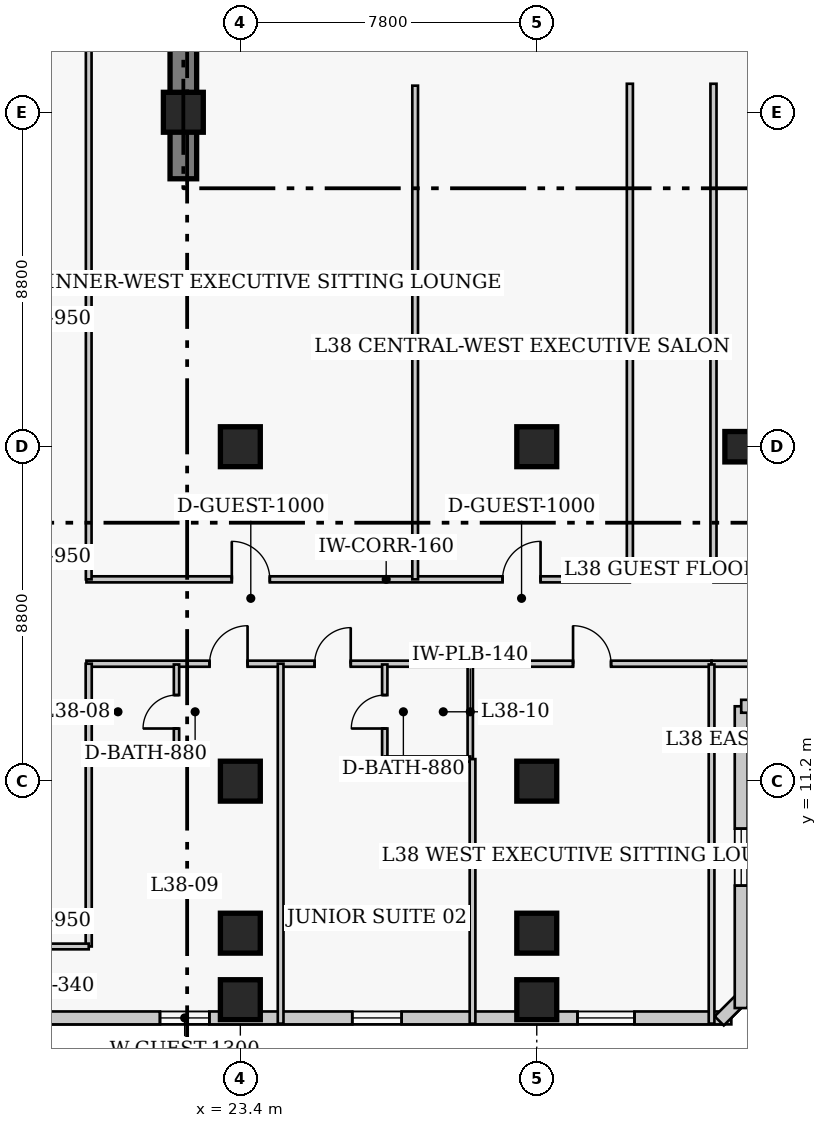
"""IFC4 building model, lengths in metres.
Left out: names, types, materials, properties, quantities, classifications, styles, units other than length and angle.
Written with IfcOpenShell. Run it as: python <this file> out.ifc"""

import sys

from ifc_helpers import new_model, si_unit, direction, frame, frame_2d, origin, origin_2d, place, context, subcontext, project, spatial, rectangle, extrude, element, fill, save


model = new_model("IFC4")
c1 = context("Model", 3, precision=1e-05, world=origin(), true_north=direction((0.0, 1.0)))
c2 = subcontext(c1, "Body", "Model", "MODEL_VIEW")
j1 = project(units=[si_unit("LENGTHUNIT", "METRE"), si_unit("PLANEANGLEUNIT", "RADIAN")], contexts=[c1])
p1 = place(None, origin())
s1 = spatial("IfcSite", under=j1, at=p1, CompositionType="ELEMENT")
p2 = place(p1, origin())
s2 = spatial("IfcBuilding", under=s1, at=p2, CompositionType="ELEMENT")
p3 = place(p2, frame((0.0, 0.0, 153.6)))
s3 = spatial("IfcBuildingStorey", under=s2, at=p3, CompositionType="ELEMENT", Elevation=153.6)
p4 = place(p3, frame((21.9, 27.05, 0.0), z_axis=(0.0, 0.0, 1.0), x_axis=(0.0, 1.0, 0.0)))
e1 = element("IfcWall", 1, at=p4, inside=s3, PredefinedType="SHEAR", context=c2, shape_type="SweptSolid", body=[
    extrude(rectangle(XDim=13.62, YDim=0.7, at=frame_2d((6.81, 0.0))), origin(), (0.0, 0.0, 1.0), 3.8),
])
for number, where, z_axis, x_axis in (
    (2, (23.4, 11.2, 0.0), (0.0, 0.0, 1.0), (1.0, 0.0, 0.0)),
    (3, (23.4, 20.0, 0.0), (0.0, 0.0, 1.0), (1.0, 0.0, 0.0)),
    (4, (31.2, 11.2, 0.0), (0.0, 0.0, 1.0), (1.0, 0.0, 0.0)),
    (5, (31.2, 20.0, 0.0), (0.0, 0.0, 1.0), (1.0, 0.0, 0.0)),
):
    element("IfcColumn", number, at=place(p3, frame(where, z_axis=z_axis, x_axis=x_axis)), inside=s3, PredefinedType="COLUMN", context=c2, shape_type="SweptSolid", body=[
        extrude(rectangle(XDim=1.05, YDim=1.05, at=origin_2d()), origin(), (0.0, 0.0, 1.0), 3.8),
    ])
p5 = place(p3, frame((36.75, 20.0, 0.0), z_axis=(0.0, 0.0, 1.0), x_axis=(1.0, 0.0, 0.0)))
e6 = element("IfcColumn", 6, at=p5, inside=s3, PredefinedType="COLUMN", context=c2, shape_type="SweptSolid", body=[
    extrude(rectangle(XDim=1.2, YDim=0.8, at=origin_2d()), origin(), (0.0, 0.0, 1.0), 3.8),
])
for number, where, z_axis, x_axis in (
    (7, (21.9, 28.8, 0.0), (0.0, 0.0, 1.0), (1.0, 0.0, 0.0)),
    (8, (23.4, 7.2, 0.0), (0.0, 0.0, 1.0), (1.0, 0.0, 0.0)),
    (9, (31.2, 7.2, 0.0), (0.0, 0.0, 1.0), (1.0, 0.0, 0.0)),
    (10, (23.4, 5.45, 0.0), (0.0, 0.0, 1.0), (1.0, 0.0, 0.0)),
    (11, (31.2, 5.45, 0.0), (0.0, 0.0, 1.0), (1.0, 0.0, 0.0)),
):
    element("IfcColumn", number, at=place(p3, frame(where, z_axis=z_axis, x_axis=x_axis)), inside=s3, PredefinedType="COLUMN", context=c2, shape_type="SweptSolid", body=[
        extrude(rectangle(XDim=1.05, YDim=1.05, at=origin_2d()), origin(), (0.0, 0.0, 1.0), 3.8),
    ])
p6 = place(p3, frame((9.63, 4.97, 0.0), z_axis=(0.0, 0.0, 1.0), x_axis=(1.0, 0.0, 0.0)))
e12 = element("IfcWall", 12, at=p6, inside=s3, PredefinedType="SOLIDWALL", context=c2, shape_type="SweptSolid", body=[
    extrude(rectangle(XDim=26.69, YDim=0.34, at=frame_2d((13.345, 0.0))), origin(), (0.0, 0.0, 1.0), 3.55),
])
p7 = place(p6, frame((3.048, 0.0, 0.85)))
e13 = element("IfcOpeningElement", 13, at=p7, cuts=e12, PredefinedType="OPENING", context=c2, shape_type="SweptSolid", body=[
    extrude(rectangle(XDim=1.5, YDim=1.75, at=frame_2d((0.75, 0.875))), frame((0.0, 0.18, 0.0), z_axis=(0.0, -1.0, 0.0), x_axis=(1.0, 0.0, 0.0)), (0.0, 0.0, 1.0), 0.36),
])
p8 = place(p6, frame((22.642, 0.0, 0.85)))
e14 = element("IfcOpeningElement", 14, at=p8, cuts=e12, PredefinedType="OPENING", context=c2, shape_type="SweptSolid", body=[
    extrude(rectangle(XDim=1.5, YDim=1.75, at=frame_2d((0.75, 0.875))), frame((0.0, 0.18, 0.0), z_axis=(0.0, -1.0, 0.0), x_axis=(1.0, 0.0, 0.0)), (0.0, 0.0, 1.0), 0.36),
])
p9 = place(p6, frame((11.655, 0.0, 0.85)))
e15 = element("IfcOpeningElement", 15, at=p9, cuts=e12, PredefinedType="OPENING", context=c2, shape_type="SweptSolid", body=[
    extrude(rectangle(XDim=1.3, YDim=1.7, at=frame_2d((0.65, 0.85))), frame((0.0, 0.18, 0.0), z_axis=(0.0, -1.0, 0.0), x_axis=(1.0, 0.0, 0.0)), (0.0, 0.0, 1.0), 0.36),
])
p10 = place(p6, frame((16.715, 0.0, 0.85)))
e16 = element("IfcOpeningElement", 16, at=p10, cuts=e12, PredefinedType="OPENING", context=c2, shape_type="SweptSolid", body=[
    extrude(rectangle(XDim=1.3, YDim=1.7, at=frame_2d((0.65, 0.85))), frame((0.0, 0.18, 0.0), z_axis=(0.0, -1.0, 0.0), x_axis=(1.0, 0.0, 0.0)), (0.0, 0.0, 1.0), 0.36),
])
p11 = place(p3, frame((36.001, 4.892, 0.0), z_axis=(0.0, 0.0, 1.0), x_axis=(0.707106781187, 0.707106781187, 0.0)))
e17 = element("IfcWall", 17, at=p11, inside=s3, PredefinedType="SOLIDWALL", context=c2, shape_type="SweptSolid", body=[
    extrude(rectangle(XDim=0.929, YDim=0.34, at=frame_2d((0.464, 0.0))), origin(), (0.0, 0.0, 1.0), 3.55),
])
p12 = place(p3, frame((36.58, 5.23, 0.0), z_axis=(0.0, 0.0, 1.0), x_axis=(0.0, 1.0, 0.0)))
e18 = element("IfcWall", 18, at=p12, inside=s3, PredefinedType="SOLIDWALL", context=c2, shape_type="SweptSolid", body=[
    extrude(rectangle(XDim=7.94, YDim=0.34, at=frame_2d((3.97, 0.0))), origin(), (0.0, 0.0, 1.0), 3.55),
])
p13 = place(p12, frame((3.22, 0.0, 0.85)))
e19 = element("IfcOpeningElement", 19, at=p13, cuts=e18, PredefinedType="OPENING", context=c2, shape_type="SweptSolid", body=[
    extrude(rectangle(XDim=1.5, YDim=1.75, at=frame_2d((0.75, 0.875))), frame((0.0, 0.18, 0.0), z_axis=(0.0, -1.0, 0.0), x_axis=(1.0, 0.0, 0.0)), (0.0, 0.0, 1.0), 0.36),
])
p14 = place(p3, frame((36.58, 13.17, 0.0), z_axis=(0.0, 0.0, 1.0), x_axis=(1.0, 0.0, 0.0)))
e20 = element("IfcWall", 20, at=p14, inside=s3, PredefinedType="SOLIDWALL", context=c2, shape_type="SweptSolid", body=[
    extrude(rectangle(XDim=4.84, YDim=0.34, at=frame_2d((2.42, 0.0))), origin(), (0.0, 0.0, 1.0), 3.55),
])
p15 = place(p14, frame((1.67, 0.0, 0.85)))
e21 = element("IfcOpeningElement", 21, at=p15, cuts=e20, PredefinedType="OPENING", context=c2, shape_type="SweptSolid", body=[
    extrude(rectangle(XDim=1.5, YDim=1.75, at=frame_2d((0.75, 0.875))), frame((0.0, 0.18, 0.0), z_axis=(0.0, -1.0, 0.0), x_axis=(1.0, 0.0, 0.0)), (0.0, 0.0, 1.0), 0.36),
])
p16 = place(p3, frame((19.35, 16.51, 0.0), z_axis=(0.0, 0.0, 1.0), x_axis=(1.0, 0.0, 0.0)))
e22 = element("IfcWall", 22, at=p16, inside=s3, PredefinedType="PARTITIONING", context=c2, shape_type="SweptSolid", body=[
    extrude(rectangle(XDim=14.3, YDim=0.16, at=frame_2d((7.15, 0.0))), origin(), (0.0, 0.0, 1.0), 3.55),
])
p17 = place(p16, frame((3.825, 0.0, 0.0)))
e23 = element("IfcOpeningElement", 23, at=p17, cuts=e22, PredefinedType="OPENING", context=c2, shape_type="SweptSolid", body=[
    extrude(rectangle(XDim=1.0, YDim=2.15, at=frame_2d((0.5, 1.075))), frame((0.0, 0.09, 0.0), z_axis=(0.0, -1.0, 0.0), x_axis=(1.0, 0.0, 0.0)), (0.0, 0.0, 1.0), 0.18),
])
p18 = place(p16, frame((10.95, 0.0, 0.0)))
e24 = element("IfcOpeningElement", 24, at=p18, cuts=e22, PredefinedType="OPENING", context=c2, shape_type="SweptSolid", body=[
    extrude(rectangle(XDim=1.0, YDim=2.15, at=frame_2d((0.5, 1.075))), frame((0.0, 0.09, 0.0), z_axis=(0.0, -1.0, 0.0), x_axis=(1.0, 0.0, 0.0)), (0.0, 0.0, 1.0), 0.18),
])
p19 = place(p3, frame((35.85, 16.51, 0.0), z_axis=(0.0, 0.0, 1.0), x_axis=(1.0, 0.0, 0.0)))
e25 = element("IfcWall", 25, at=p19, inside=s3, PredefinedType="PARTITIONING", context=c2, shape_type="SweptSolid", body=[
    extrude(rectangle(XDim=22.6, YDim=0.16, at=frame_2d((11.3, 0.0))), origin(), (0.0, 0.0, 1.0), 3.55),
])
p20 = place(p19, frame((10.35, 0.0, 0.0)))
e26 = element("IfcOpeningElement", 26, at=p20, cuts=e25, PredefinedType="OPENING", context=c2, shape_type="SweptSolid", body=[
    extrude(rectangle(XDim=1.0, YDim=2.15, at=frame_2d((0.5, 1.075))), frame((0.0, 0.09, 0.0), z_axis=(0.0, -1.0, 0.0), x_axis=(1.0, 0.0, 0.0)), (0.0, 0.0, 1.0), 0.18),
])
p21 = place(p19, frame((18.65, 0.0, 0.0)))
e27 = element("IfcOpeningElement", 27, at=p21, cuts=e25, PredefinedType="OPENING", context=c2, shape_type="SweptSolid", body=[
    extrude(rectangle(XDim=1.0, YDim=2.15, at=frame_2d((0.5, 1.075))), frame((0.0, 0.09, 0.0), z_axis=(0.0, -1.0, 0.0), x_axis=(1.0, 0.0, 0.0)), (0.0, 0.0, 1.0), 0.18),
])
for number, where, z_axis, x_axis in (
    (28, (33.65, 16.51, 0.0), (0.0, 0.0, 1.0), (0.0, 1.0, 0.0)),
    (29, (35.85, 16.51, 0.0), (0.0, 0.0, 1.0), (0.0, 1.0, 0.0)),
):
    element("IfcWall", number, at=place(p3, frame(where, z_axis=z_axis, x_axis=x_axis)), inside=s3, PredefinedType="PARTITIONING", context=c2, shape_type="SweptSolid", body=[
        extrude(rectangle(XDim=13.04, YDim=0.16, at=frame_2d((6.52, 0.0))), origin(), (0.0, 0.0, 1.0), 3.55),
    ])
p22 = place(p3, frame((19.35, 14.29, 0.0), z_axis=(0.0, 0.0, 1.0), x_axis=(1.0, 0.0, 0.0)))
e30 = element("IfcWall", 30, at=p22, inside=s3, PredefinedType="PARTITIONING", context=c2, shape_type="SweptSolid", body=[
    extrude(rectangle(XDim=16.45, YDim=0.16, at=frame_2d((8.225, 0.0))), origin(), (0.0, 0.0, 1.0), 3.55),
])
p23 = place(p22, frame((3.24, 0.0, 0.0)))
e31 = element("IfcOpeningElement", 31, at=p23, cuts=e30, PredefinedType="OPENING", context=c2, shape_type="SweptSolid", body=[
    extrude(rectangle(XDim=1.0, YDim=2.15, at=frame_2d((0.5, 1.075))), frame((0.0, 0.09, 0.0), z_axis=(0.0, -1.0, 0.0), x_axis=(1.0, 0.0, 0.0)), (0.0, 0.0, 1.0), 0.18),
])
p24 = place(p22, frame((6.005, 0.0, 0.0)))
e32 = element("IfcOpeningElement", 32, at=p24, cuts=e30, PredefinedType="OPENING", context=c2, shape_type="SweptSolid", body=[
    extrude(rectangle(XDim=0.95, YDim=2.1, at=frame_2d((0.475, 1.05))), frame((0.0, 0.09, 0.0), z_axis=(0.0, -1.0, 0.0), x_axis=(1.0, 0.0, 0.0)), (0.0, 0.0, 1.0), 0.18),
])
p25 = place(p22, frame((12.805, 0.0, 0.0)))
e33 = element("IfcOpeningElement", 33, at=p25, cuts=e30, PredefinedType="OPENING", context=c2, shape_type="SweptSolid", body=[
    extrude(rectangle(XDim=1.0, YDim=2.15, at=frame_2d((0.5, 1.075))), frame((0.0, 0.09, 0.0), z_axis=(0.0, -1.0, 0.0), x_axis=(1.0, 0.0, 0.0)), (0.0, 0.0, 1.0), 0.18),
])
p26 = place(p3, frame((35.8, 14.29, 0.0), z_axis=(0.0, 0.0, 1.0), x_axis=(1.0, 0.0, 0.0)))
e34 = element("IfcWall", 34, at=p26, inside=s3, PredefinedType="PARTITIONING", context=c2, shape_type="SweptSolid", body=[
    extrude(rectangle(XDim=22.65, YDim=0.16, at=frame_2d((11.325, 0.0))), origin(), (0.0, 0.0, 1.0), 3.55),
])
p27 = place(p26, frame((4.873, 0.0, 0.0)))
e35 = element("IfcOpeningElement", 35, at=p27, cuts=e34, PredefinedType="OPENING", context=c2, shape_type="SweptSolid", body=[
    extrude(rectangle(XDim=1.0, YDim=2.15, at=frame_2d((0.5, 1.075))), frame((0.0, 0.09, 0.0), z_axis=(0.0, -1.0, 0.0), x_axis=(1.0, 0.0, 0.0)), (0.0, 0.0, 1.0), 0.18),
])
p28 = place(p3, frame((19.41, 6.85, 0.0), z_axis=(0.0, 0.0, 1.0), x_axis=(0.0, 1.0, 0.0)))
e36 = element("IfcWall", 36, at=p28, inside=s3, PredefinedType="PARTITIONING", context=c2, shape_type="SweptSolid", body=[
    extrude(rectangle(XDim=7.44, YDim=0.16, at=frame_2d((3.72, 0.0))), origin(), (0.0, 0.0, 1.0), 3.093),
])
p29 = place(p3, frame((17.19, 6.85, 0.0), z_axis=(0.0, 0.0, 1.0), x_axis=(1.0, 0.0, 0.0)))
e37 = element("IfcWall", 37, at=p29, inside=s3, PredefinedType="PARTITIONING", context=c2, shape_type="SweptSolid", body=[
    extrude(rectangle(XDim=2.22, YDim=0.15, at=frame_2d((1.11, 0.0))), origin(), (0.0, 0.0, 1.0), 3.55),
])
p30 = place(p3, frame((19.41, 16.51, 0.0), z_axis=(0.0, 0.0, 1.0), x_axis=(0.0, 1.0, 0.0)))
e38 = element("IfcWall", 38, at=p30, inside=s3, PredefinedType="PARTITIONING", context=c2, shape_type="SweptSolid", body=[
    extrude(rectangle(XDim=16.29, YDim=0.15, at=frame_2d((8.145, 0.0))), origin(), (0.0, 0.0, 1.0), 3.093),
])
p31 = place(p3, frame((28.0, 16.51, 0.0), z_axis=(0.0, 0.0, 1.0), x_axis=(0.0, 1.0, 0.0)))
e39 = element("IfcWall", 39, at=p31, inside=s3, PredefinedType="PARTITIONING", context=c2, shape_type="SweptSolid", body=[
    extrude(rectangle(XDim=12.99, YDim=0.15, at=frame_2d((6.495, 0.0))), origin(), (0.0, 0.0, 1.0), 3.55),
])
p32 = place(p3, frame((21.72, 11.78, 0.0), z_axis=(0.0, 0.0, 1.0), x_axis=(0.0, 1.0, 0.0)))
e40 = element("IfcWall", 40, at=p32, inside=s3, PredefinedType="PLUMBINGWALL", context=c2, shape_type="SweptSolid", body=[
    extrude(rectangle(XDim=2.49, YDim=0.14, at=frame_2d((1.245, 0.0))), origin(), (0.0, 0.0, 1.0), 3.55),
])
p33 = place(p32, frame((0.805, 0.0, 0.0)))
e41 = element("IfcOpeningElement", 41, at=p33, cuts=e40, PredefinedType="OPENING", context=c2, shape_type="SweptSolid", body=[
    extrude(rectangle(XDim=0.88, YDim=2.05, at=frame_2d((0.44, 1.025))), frame((0.0, 0.08, 0.0), z_axis=(0.0, -1.0, 0.0), x_axis=(1.0, 0.0, 0.0)), (0.0, 0.0, 1.0), 0.16),
])
p34 = place(p3, frame((19.47, 11.78, 0.0), z_axis=(0.0, 0.0, 1.0), x_axis=(1.0, 0.0, 0.0)))
e42 = element("IfcWall", 42, at=p34, inside=s3, PredefinedType="PLUMBINGWALL", context=c2, shape_type="SweptSolid", body=[
    extrude(rectangle(XDim=2.25, YDim=0.14, at=frame_2d((1.125, 0.0))), origin(), (0.0, 0.0, 1.0), 3.55),
])
p35 = place(p3, frame((24.46, 4.82, 0.0), z_axis=(0.0, 0.0, 1.0), x_axis=(0.0, 1.0, 0.0)))
e43 = element("IfcWall", 43, at=p35, inside=s3, PredefinedType="PARTITIONING", context=c2, shape_type="SweptSolid", body=[
    extrude(rectangle(XDim=9.47, YDim=0.15, at=frame_2d((4.735, 0.0))), origin(), (0.0, 0.0, 1.0), 3.55),
])
p36 = place(p3, frame((27.2, 11.78, 0.0), z_axis=(0.0, 0.0, 1.0), x_axis=(0.0, 1.0, 0.0)))
e44 = element("IfcWall", 44, at=p36, inside=s3, PredefinedType="PLUMBINGWALL", context=c2, shape_type="SweptSolid", body=[
    extrude(rectangle(XDim=2.49, YDim=0.14, at=frame_2d((1.245, 0.0))), origin(), (0.0, 0.0, 1.0), 3.093),
])
p37 = place(p36, frame((0.805, 0.0, 0.0)))
e45 = element("IfcOpeningElement", 45, at=p37, cuts=e44, PredefinedType="OPENING", context=c2, shape_type="SweptSolid", body=[
    extrude(rectangle(XDim=0.88, YDim=2.05, at=frame_2d((0.44, 1.025))), frame((0.0, 0.08, 0.0), z_axis=(0.0, -1.0, 0.0), x_axis=(1.0, 0.0, 0.0)), (0.0, 0.0, 1.0), 0.16),
])
p38 = place(p3, frame((29.45, 11.78, 0.0), z_axis=(0.0, 0.0, 1.0), x_axis=(0.0, 1.0, 0.0)))
e46 = element("IfcWall", 46, at=p38, inside=s3, PredefinedType="PLUMBINGWALL", context=c2, shape_type="SweptSolid", body=[
    extrude(rectangle(XDim=2.49, YDim=0.14, at=frame_2d((1.245, 0.0))), origin(), (0.0, 0.0, 1.0), 3.55),
])
p39 = place(p3, frame((27.2, 11.78, 0.0), z_axis=(0.0, 0.0, 1.0), x_axis=(1.0, 0.0, 0.0)))
e47 = element("IfcWall", 47, at=p39, inside=s3, PredefinedType="PLUMBINGWALL", context=c2, shape_type="SweptSolid", body=[
    extrude(rectangle(XDim=2.25, YDim=0.14, at=frame_2d((1.125, 0.0))), origin(), (0.0, 0.0, 1.0), 3.55),
])
p40 = place(p3, frame((29.51, 4.82, 0.0), z_axis=(0.0, 0.0, 1.0), x_axis=(0.0, 1.0, 0.0)))
e48 = element("IfcWall", 48, at=p40, inside=s3, PredefinedType="PARTITIONING", context=c2, shape_type="SweptSolid", body=[
    extrude(rectangle(XDim=6.96, YDim=0.15, at=frame_2d((3.48, 0.0))), origin(), (0.0, 0.0, 1.0), 3.55),
])
p41 = place(p3, frame((35.8, 4.82, 0.0), z_axis=(0.0, 0.0, 1.0), x_axis=(0.0, 1.0, 0.0)))
e49 = element("IfcWall", 49, at=p41, inside=s3, PredefinedType="PARTITIONING", context=c2, shape_type="SweptSolid", body=[
    extrude(rectangle(XDim=9.45, YDim=0.15, at=frame_2d((4.725, 0.0))), origin(), (0.0, 0.0, 1.0), 3.55),
])
p42 = place(p8, origin())
e50 = element("IfcWindow", 50, at=p42, inside=s3, PartitioningType="SINGLE_PANEL", PredefinedType="WINDOW", context=c2, shape_type="SweptSolid", body=[
    extrude(rectangle(XDim=1.5, YDim=1.75, at=frame_2d((0.75, 0.875))), frame((0.0, 0.03, 0.0), z_axis=(0.0, -1.0, 0.0), x_axis=(1.0, 0.0, 0.0)), (0.0, 0.0, 1.0), 0.06),
])
fill(e14, e50)
p43 = place(p13, origin())
e51 = element("IfcWindow", 51, at=p43, inside=s3, PartitioningType="SINGLE_PANEL", PredefinedType="WINDOW", context=c2, shape_type="SweptSolid", body=[
    extrude(rectangle(XDim=1.5, YDim=1.75, at=frame_2d((0.75, 0.875))), frame((0.0, 0.03, 0.0), z_axis=(0.0, -1.0, 0.0), x_axis=(1.0, 0.0, 0.0)), (0.0, 0.0, 1.0), 0.06),
])
fill(e19, e51)
p44 = place(p9, origin())
e52 = element("IfcWindow", 52, at=p44, inside=s3, PartitioningType="SINGLE_PANEL", PredefinedType="WINDOW", context=c2, shape_type="SweptSolid", body=[
    extrude(rectangle(XDim=1.3, YDim=1.7, at=frame_2d((0.65, 0.85))), frame((0.0, 0.03, 0.0), z_axis=(0.0, -1.0, 0.0), x_axis=(1.0, 0.0, 0.0)), (0.0, 0.0, 1.0), 0.06),
])
fill(e15, e52)
p45 = place(p10, origin())
e53 = element("IfcWindow", 53, at=p45, inside=s3, PartitioningType="SINGLE_PANEL", PredefinedType="WINDOW", context=c2, shape_type="SweptSolid", body=[
    extrude(rectangle(XDim=1.3, YDim=1.7, at=frame_2d((0.65, 0.85))), frame((0.0, 0.03, 0.0), z_axis=(0.0, -1.0, 0.0), x_axis=(1.0, 0.0, 0.0)), (0.0, 0.0, 1.0), 0.06),
])
fill(e16, e53)
p46 = place(p17, origin())
e54 = element("IfcDoor", 54, at=p46, inside=s3, OperationType="SINGLE_SWING_LEFT", PredefinedType="DOOR", context=c2, shape_type="SweptSolid", body=[
    extrude(rectangle(XDim=1.0, YDim=2.15, at=frame_2d((0.5, 1.075))), frame((0.0, 0.025, 0.0), z_axis=(0.0, -1.0, 0.0), x_axis=(1.0, 0.0, 0.0)), (0.0, 0.0, 1.0), 0.05),
])
fill(e23, e54)
p47 = place(p18, origin())
e55 = element("IfcDoor", 55, at=p47, inside=s3, OperationType="SINGLE_SWING_RIGHT", PredefinedType="DOOR", context=c2, shape_type="SweptSolid", body=[
    extrude(rectangle(XDim=1.0, YDim=2.15, at=frame_2d((0.5, 1.075))), frame((0.0, 0.025, 0.0), z_axis=(0.0, -1.0, 0.0), x_axis=(1.0, 0.0, 0.0)), (0.0, 0.0, 1.0), 0.05),
])
fill(e24, e55)
p48 = place(p33, origin())
e56 = element("IfcDoor", 56, at=p48, inside=s3, OperationType="SINGLE_SWING_LEFT", PredefinedType="DOOR", context=c2, shape_type="SweptSolid", body=[
    extrude(rectangle(XDim=0.88, YDim=2.05, at=frame_2d((0.44, 1.025))), frame((0.0, 0.025, 0.0), z_axis=(0.0, -1.0, 0.0), x_axis=(1.0, 0.0, 0.0)), (0.0, 0.0, 1.0), 0.05),
])
fill(e41, e56)
p49 = place(p23, origin())
e57 = element("IfcDoor", 57, at=p49, inside=s3, OperationType="SINGLE_SWING_RIGHT", PredefinedType="DOOR", context=c2, shape_type="SweptSolid", body=[
    extrude(rectangle(XDim=1.0, YDim=2.15, at=frame_2d((0.5, 1.075))), frame((0.0, 0.025, 0.0), z_axis=(0.0, -1.0, 0.0), x_axis=(1.0, 0.0, 0.0)), (0.0, 0.0, 1.0), 0.05),
])
fill(e31, e57)
p50 = place(p37, origin())
e58 = element("IfcDoor", 58, at=p50, inside=s3, OperationType="SINGLE_SWING_LEFT", PredefinedType="DOOR", context=c2, shape_type="SweptSolid", body=[
    extrude(rectangle(XDim=0.88, YDim=2.05, at=frame_2d((0.44, 1.025))), frame((0.0, 0.025, 0.0), z_axis=(0.0, -1.0, 0.0), x_axis=(1.0, 0.0, 0.0)), (0.0, 0.0, 1.0), 0.05),
])
fill(e45, e58)
p51 = place(p24, origin())
e59 = element("IfcDoor", 59, at=p51, inside=s3, OperationType="SINGLE_SWING_RIGHT", PredefinedType="DOOR", context=c2, shape_type="SweptSolid", body=[
    extrude(rectangle(XDim=0.95, YDim=2.1, at=frame_2d((0.475, 1.05))), frame((0.0, 0.025, 0.0), z_axis=(0.0, -1.0, 0.0), x_axis=(1.0, 0.0, 0.0)), (0.0, 0.0, 1.0), 0.05),
])
fill(e32, e59)
p52 = place(p25, origin())
e60 = element("IfcDoor", 60, at=p52, inside=s3, OperationType="SINGLE_SWING_LEFT", PredefinedType="DOOR", context=c2, shape_type="SweptSolid", body=[
    extrude(rectangle(XDim=1.0, YDim=2.15, at=frame_2d((0.5, 1.075))), frame((0.0, 0.025, 0.0), z_axis=(0.0, -1.0, 0.0), x_axis=(1.0, 0.0, 0.0)), (0.0, 0.0, 1.0), 0.05),
])
fill(e33, e60)
save(model, sys.argv[1])
